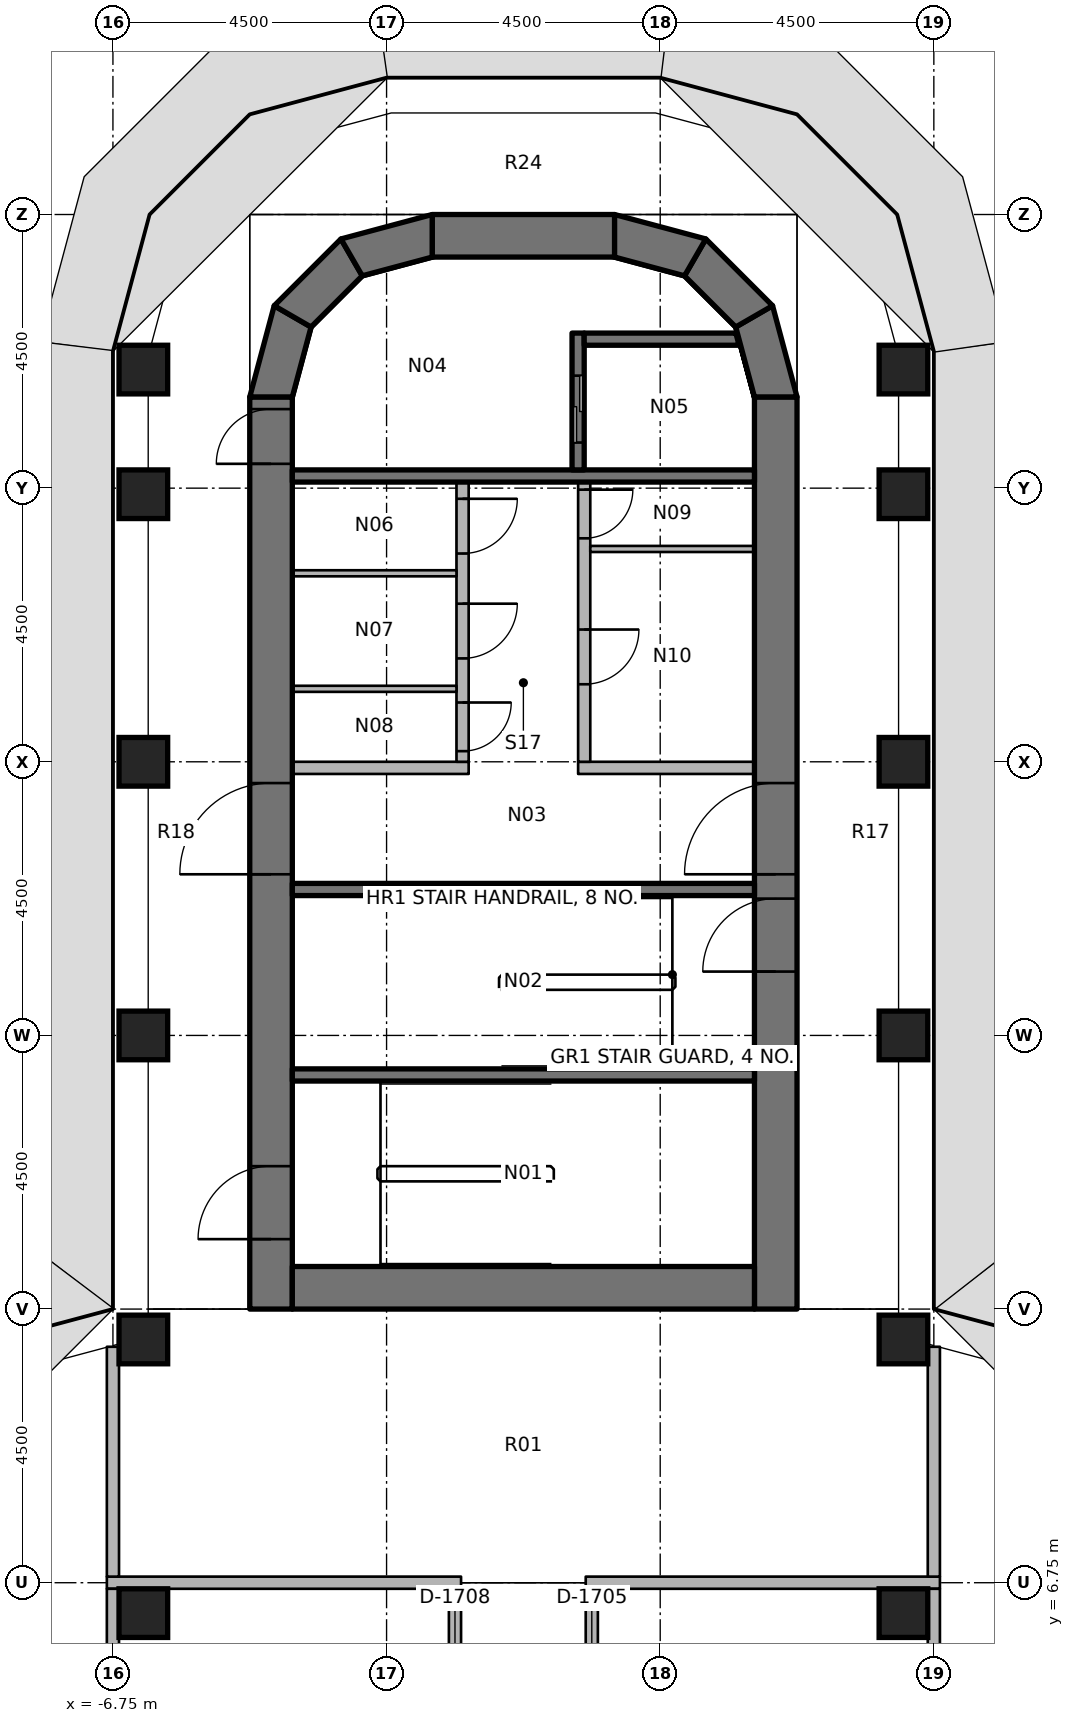
"""IFC4 building model, lengths in metres.
Left out: names, types, materials, properties, quantities, classifications, styles, units other than length and angle.
Written with IfcOpenShell. Run it as: python <this file> out.ifc"""

import sys

from ifc_helpers import new_model, si_unit, direction, frame, frame_2d, origin, origin_2d, place, context, subcontext, project, spatial, polyline, rectangle, outline, extrude, element, fill, save


model = new_model("IFC4")
c1 = context("Model", 3, precision=1e-05, world=origin(), true_north=direction((0.0, 1.0)))
c2 = subcontext(c1, "Body", "Model", "MODEL_VIEW")
j1 = project(units=[si_unit("LENGTHUNIT", "METRE"), si_unit("PLANEANGLEUNIT", "RADIAN")], contexts=[c1])
p1 = place(None, origin())
s1 = spatial("IfcSite", under=j1, at=p1, CompositionType="ELEMENT")
p2 = place(p1, origin())
s2 = spatial("IfcBuilding", under=s1, at=p2, CompositionType="ELEMENT")
p3 = place(p2, frame((0.0, 0.0, 160.0)))
s3 = spatial("IfcBuildingStorey", under=s2, at=p3, CompositionType="ELEMENT", Elevation=160.0)
for number, where, z_axis, x_axis in (
    (1, (-6.25, 6.25, 0.0), (0.0, 0.0, 1.0), (1.0, 0.0, 0.0)),
    (2, (-6.25, 10.75, 0.0), (0.0, 0.0, 1.0), (1.0, 0.0, 0.0)),
    (3, (-6.25, 15.75, 0.0), (0.0, 0.0, 1.0), (1.0, 0.0, 0.0)),
    (4, (-6.25, 20.25, 0.0), (0.0, 0.0, 1.0), (1.0, 0.0, 0.0)),
    (5, (-6.25, 24.65, 0.0), (0.0, 0.0, 1.0), (1.0, 0.0, 0.0)),
    (6, (-6.25, 26.7, 0.0), (0.0, 0.0, 1.0), (1.0, 0.0, 0.0)),
    (7, (6.25, 6.25, 0.0), (0.0, 0.0, 1.0), (1.0, 0.0, 0.0)),
    (8, (6.25, 10.75, 0.0), (0.0, 0.0, 1.0), (1.0, 0.0, 0.0)),
    (9, (6.25, 15.75, 0.0), (0.0, 0.0, 1.0), (1.0, 0.0, 0.0)),
    (10, (6.25, 20.25, 0.0), (0.0, 0.0, 1.0), (1.0, 0.0, 0.0)),
    (11, (6.25, 24.65, 0.0), (0.0, 0.0, 1.0), (1.0, 0.0, 0.0)),
    (12, (6.25, 26.7, 0.0), (0.0, 0.0, 1.0), (1.0, 0.0, 0.0)),
):
    element("IfcColumn", number, at=place(p3, frame(where, z_axis=z_axis, x_axis=x_axis)), inside=s3, PredefinedType="COLUMN", context=c2, shape_type="SweptSolid", body=[
        extrude(rectangle(XDim=0.8, YDim=0.8, at=origin_2d()), origin(), (0.0, 0.0, 1.0), 3.65),
    ])
p4 = place(p3, frame((-4.15, 11.25, 0.0), z_axis=(0.0, 0.0, 1.0), x_axis=(0.0, 1.0, 0.0)))
e13 = element("IfcWall", 13, at=p4, inside=s3, PredefinedType="SHEAR", context=c2, shape_type="SweptSolid", body=[
    extrude(rectangle(XDim=15.0, YDim=0.7, at=frame_2d((7.5, 0.0))), origin(), (0.0, 0.0, 1.0), 3.8),
])
p5 = place(p4, frame((7.15, 0.0, 0.0)))
e14 = element("IfcOpeningElement", 14, at=p5, cuts=e13, PredefinedType="OPENING", context=c2, shape_type="SweptSolid", body=[
    extrude(rectangle(XDim=1.5, YDim=2.3, at=frame_2d((0.75, 1.15))), frame((0.0, 0.36, 0.0), z_axis=(0.0, -1.0, 0.0), x_axis=(1.0, 0.0, 0.0)), (0.0, 0.0, 1.0), 0.72),
])
p6 = place(p4, frame((13.9, 0.0, 0.0)))
e15 = element("IfcOpeningElement", 15, at=p6, cuts=e13, PredefinedType="OPENING", context=c2, shape_type="SweptSolid", body=[
    extrude(rectangle(XDim=0.9, YDim=2.1, at=frame_2d((0.45, 1.05))), frame((0.0, 0.36, 0.0), z_axis=(0.0, -1.0, 0.0), x_axis=(1.0, 0.0, 0.0)), (0.0, 0.0, 1.0), 0.72),
])
p7 = place(p4, frame((1.15, 0.0, 0.0)))
e16 = element("IfcOpeningElement", 16, at=p7, cuts=e13, PredefinedType="OPENING", context=c2, shape_type="SweptSolid", body=[
    extrude(rectangle(XDim=1.2, YDim=2.1, at=frame_2d((0.6, 1.05))), frame((0.0, 0.36, 0.0), z_axis=(0.0, -1.0, 0.0), x_axis=(1.0, 0.0, 0.0)), (0.0, 0.0, 1.0), 0.72),
])
p8 = place(p3, frame((4.15, 11.25, 0.0), z_axis=(0.0, 0.0, 1.0), x_axis=(0.0, 1.0, 0.0)))
e17 = element("IfcWall", 17, at=p8, inside=s3, PredefinedType="SHEAR", context=c2, shape_type="SweptSolid", body=[
    extrude(rectangle(XDim=15.0, YDim=0.7, at=frame_2d((7.5, 0.0))), origin(), (0.0, 0.0, 1.0), 3.8),
])
p9 = place(p8, frame((7.15, 0.0, 0.0)))
e18 = element("IfcOpeningElement", 18, at=p9, cuts=e17, PredefinedType="OPENING", context=c2, shape_type="SweptSolid", body=[
    extrude(rectangle(XDim=1.5, YDim=2.3, at=frame_2d((0.75, 1.15))), frame((0.0, 0.36, 0.0), z_axis=(0.0, -1.0, 0.0), x_axis=(1.0, 0.0, 0.0)), (0.0, 0.0, 1.0), 0.72),
])
p10 = place(p8, frame((5.55, 0.0, 0.0)))
e19 = element("IfcOpeningElement", 19, at=p10, cuts=e17, PredefinedType="OPENING", context=c2, shape_type="SweptSolid", body=[
    extrude(rectangle(XDim=1.2, YDim=2.1, at=frame_2d((0.6, 1.05))), frame((0.0, 0.36, 0.0), z_axis=(0.0, -1.0, 0.0), x_axis=(1.0, 0.0, 0.0)), (0.0, 0.0, 1.0), 0.72),
])
p11 = place(p3, frame((-3.8, 11.6, 0.0), z_axis=(0.0, 0.0, 1.0), x_axis=(1.0, 0.0, 0.0)))
e20 = element("IfcWall", 20, at=p11, inside=s3, PredefinedType="SHEAR", context=c2, shape_type="SweptSolid", body=[
    extrude(rectangle(XDim=7.6, YDim=0.7, at=frame_2d((3.8, 0.0))), origin(), (0.0, 0.0, 1.0), 3.8),
])
p12 = place(p3, frame((-1.5, 28.9, 0.0), z_axis=(0.0, 0.0, 1.0), x_axis=(1.0, 0.0, 0.0)))
e21 = element("IfcWall", 21, at=p12, inside=s3, PredefinedType="SHEAR", context=c2, shape_type="SweptSolid", body=[
    extrude(rectangle(XDim=3.0, YDim=0.7, at=frame_2d((1.5, 0.0))), origin(), (0.0, 0.0, 1.0), 3.8),
])
p13 = place(p3, origin())
e22 = element("IfcWall", 22, at=p13, inside=s3, PredefinedType="SHEAR", context=c2, shape_type="SweptSolid", body=[
    extrude(outline(polyline([(-4.5, 26.25), (-4.098, 27.75), (-3.492, 27.4), (-3.8, 26.25), (-4.5, 26.25)])), origin(), (0.0, 0.0, 1.0), 3.8),
])
p14 = place(p3, origin())
e23 = element("IfcWall", 23, at=p14, inside=s3, PredefinedType="SHEAR", context=c2, shape_type="SweptSolid", body=[
    extrude(outline(polyline([(-4.098, 27.75), (-3.0, 28.848), (-2.65, 28.242), (-3.492, 27.4), (-4.098, 27.75)])), origin(), (0.0, 0.0, 1.0), 3.8),
])
p15 = place(p3, origin())
e24 = element("IfcWall", 24, at=p15, inside=s3, PredefinedType="SHEAR", context=c2, shape_type="SweptSolid", body=[
    extrude(outline(polyline([(-3.0, 28.848), (-1.5, 29.25), (-1.5, 28.55), (-2.65, 28.242), (-3.0, 28.848)])), origin(), (0.0, 0.0, 1.0), 3.8),
])
p16 = place(p3, origin())
e25 = element("IfcWall", 25, at=p16, inside=s3, PredefinedType="SHEAR", context=c2, shape_type="SweptSolid", body=[
    extrude(outline(polyline([(4.5, 26.25), (4.098, 27.75), (3.492, 27.4), (3.8, 26.25), (4.5, 26.25)])), origin(), (0.0, 0.0, 1.0), 3.8),
])
p17 = place(p3, origin())
e26 = element("IfcWall", 26, at=p17, inside=s3, PredefinedType="SHEAR", context=c2, shape_type="SweptSolid", body=[
    extrude(outline(polyline([(4.098, 27.75), (3.0, 28.848), (2.65, 28.242), (3.492, 27.4), (4.098, 27.75)])), origin(), (0.0, 0.0, 1.0), 3.8),
])
p18 = place(p3, origin())
e27 = element("IfcWall", 27, at=p18, inside=s3, PredefinedType="SHEAR", context=c2, shape_type="SweptSolid", body=[
    extrude(outline(polyline([(3.0, 28.848), (1.5, 29.25), (1.5, 28.55), (2.65, 28.242), (3.0, 28.848)])), origin(), (0.0, 0.0, 1.0), 3.8),
])
p19 = place(p3, frame((-3.8, 24.95, 0.0), z_axis=(0.0, 0.0, 1.0), x_axis=(1.0, 0.0, 0.0)))
e28 = element("IfcWall", 28, at=p19, inside=s3, PredefinedType="SHEAR", context=c2, shape_type="SweptSolid", body=[
    extrude(rectangle(XDim=7.6, YDim=0.2, at=frame_2d((3.8, 0.0))), origin(), (0.0, 0.0, 1.0), 3.65),
])
p20 = place(p3, frame((0.9, 27.3, 0.0), z_axis=(0.0, 0.0, 1.0), x_axis=(0.0, -1.0, 0.0)))
e29 = element("IfcWall", 29, at=p20, inside=s3, PredefinedType="SHEAR", context=c2, shape_type="SweptSolid", body=[
    extrude(rectangle(XDim=2.25, YDim=0.2, at=frame_2d((1.125, 0.0))), origin(), (0.0, 0.0, 1.0), 3.65),
])
p21 = place(p20, frame((0.7, 0.0, 0.0)))
e30 = element("IfcOpeningElement", 30, at=p21, cuts=e29, PredefinedType="OPENING", context=c2, shape_type="SweptSolid", body=[
    extrude(rectangle(XDim=1.1, YDim=2.3, at=frame_2d((0.55, 1.15))), frame((0.0, 0.11, 0.0), z_axis=(0.0, -1.0, 0.0), x_axis=(1.0, 0.0, 0.0)), (0.0, 0.0, 1.0), 0.22),
])
p22 = place(p3, origin())
e31 = element("IfcWall", 31, at=p22, inside=s3, PredefinedType="SHEAR", context=c2, shape_type="SweptSolid", body=[
    extrude(outline(polyline([(1.0, 27.1), (3.548, 27.1), (3.494, 27.3), (1.0, 27.3), (1.0, 27.1)])), origin(), (0.0, 0.0, 1.0), 3.65),
])
for number, where, z_axis, x_axis in (
    (32, (-3.8, 18.15, 0.0), (0.0, 0.0, 1.0), (1.0, 0.0, 0.0)),
    (33, (-3.8, 15.1, 0.0), (0.0, 0.0, 1.0), (1.0, 0.0, 0.0)),
):
    element("IfcWall", number, at=place(p3, frame(where, z_axis=z_axis, x_axis=x_axis)), inside=s3, PredefinedType="SHEAR", context=c2, shape_type="SweptSolid", body=[
        extrude(rectangle(XDim=7.6, YDim=0.2, at=frame_2d((3.8, 0.0))), origin(), (0.0, 0.0, 1.0), 3.65),
    ])
p23 = place(p3, frame((-3.8, 20.15, 0.0), z_axis=(0.0, 0.0, 1.0), x_axis=(1.0, 0.0, 0.0)))
e34 = element("IfcWall", 34, at=p23, inside=s3, PredefinedType="PARTITIONING", context=c2, shape_type="SweptSolid", body=[
    extrude(rectangle(XDim=2.9, YDim=0.2, at=frame_2d((1.45, 0.0))), origin(), (0.0, 0.0, 1.0), 3.65),
])
p24 = place(p3, frame((-1.0, 24.85, 0.0), z_axis=(0.0, 0.0, 1.0), x_axis=(0.0, -1.0, 0.0)))
e35 = element("IfcWall", 35, at=p24, inside=s3, PredefinedType="PARTITIONING", context=c2, shape_type="SweptSolid", body=[
    extrude(rectangle(XDim=4.6, YDim=0.2, at=frame_2d((2.3, 0.0))), origin(), (0.0, 0.0, 1.0), 3.65),
])
p25 = place(p24, frame((0.275, 0.0, 0.0)))
e36 = element("IfcOpeningElement", 36, at=p25, cuts=e35, PredefinedType="OPENING", context=c2, shape_type="SweptSolid", body=[
    extrude(rectangle(XDim=0.9, YDim=2.1, at=frame_2d((0.45, 1.05))), frame((0.0, 0.11, 0.0), z_axis=(0.0, -1.0, 0.0), x_axis=(1.0, 0.0, 0.0)), (0.0, 0.0, 1.0), 0.22),
])
p26 = place(p24, frame((2.0, 0.0, 0.0)))
e37 = element("IfcOpeningElement", 37, at=p26, cuts=e35, PredefinedType="OPENING", context=c2, shape_type="SweptSolid", body=[
    extrude(rectangle(XDim=0.9, YDim=2.1, at=frame_2d((0.45, 1.05))), frame((0.0, 0.11, 0.0), z_axis=(0.0, -1.0, 0.0), x_axis=(1.0, 0.0, 0.0)), (0.0, 0.0, 1.0), 0.22),
])
p27 = place(p24, frame((3.625, 0.0, 0.0)))
e38 = element("IfcOpeningElement", 38, at=p27, cuts=e35, PredefinedType="OPENING", context=c2, shape_type="SweptSolid", body=[
    extrude(rectangle(XDim=0.8, YDim=2.1, at=frame_2d((0.4, 1.05))), frame((0.0, 0.11, 0.0), z_axis=(0.0, -1.0, 0.0), x_axis=(1.0, 0.0, 0.0)), (0.0, 0.0, 1.0), 0.22),
])
p28 = place(p3, frame((0.9, 20.15, 0.0), z_axis=(0.0, 0.0, 1.0), x_axis=(1.0, 0.0, 0.0)))
e39 = element("IfcWall", 39, at=p28, inside=s3, PredefinedType="PARTITIONING", context=c2, shape_type="SweptSolid", body=[
    extrude(rectangle(XDim=2.9, YDim=0.2, at=frame_2d((1.45, 0.0))), origin(), (0.0, 0.0, 1.0), 3.65),
])
p29 = place(p3, frame((1.0, 24.85, 0.0), z_axis=(0.0, 0.0, 1.0), x_axis=(0.0, -1.0, 0.0)))
e40 = element("IfcWall", 40, at=p29, inside=s3, PredefinedType="PARTITIONING", context=c2, shape_type="SweptSolid", body=[
    extrude(rectangle(XDim=4.6, YDim=0.2, at=frame_2d((2.3, 0.0))), origin(), (0.0, 0.0, 1.0), 3.65),
])
p30 = place(p29, frame((0.125, 0.0, 0.0)))
e41 = element("IfcOpeningElement", 41, at=p30, cuts=e40, PredefinedType="OPENING", context=c2, shape_type="SweptSolid", body=[
    extrude(rectangle(XDim=0.8, YDim=2.1, at=frame_2d((0.4, 1.05))), frame((0.0, 0.11, 0.0), z_axis=(0.0, -1.0, 0.0), x_axis=(1.0, 0.0, 0.0)), (0.0, 0.0, 1.0), 0.22),
])
p31 = place(p29, frame((2.425, 0.0, 0.0)))
e42 = element("IfcOpeningElement", 42, at=p31, cuts=e40, PredefinedType="OPENING", context=c2, shape_type="SweptSolid", body=[
    extrude(rectangle(XDim=0.9, YDim=2.1, at=frame_2d((0.45, 1.05))), frame((0.0, 0.11, 0.0), z_axis=(0.0, -1.0, 0.0), x_axis=(1.0, 0.0, 0.0)), (0.0, 0.0, 1.0), 0.22),
])
for number, where, z_axis, x_axis in (
    (43, (-3.8, 23.35, 0.0), (0.0, 0.0, 1.0), (1.0, 0.0, 0.0)),
    (44, (-3.8, 21.45, 0.0), (0.0, 0.0, 1.0), (1.0, 0.0, 0.0)),
    (45, (1.1, 23.75, 0.0), (0.0, 0.0, 1.0), (1.0, 0.0, 0.0)),
):
    element("IfcWall", number, at=place(p3, frame(where, z_axis=z_axis, x_axis=x_axis)), inside=s3, PredefinedType="PARTITIONING", context=c2, shape_type="SweptSolid", body=[
        extrude(rectangle(XDim=2.7, YDim=0.1, at=frame_2d((1.35, 0.0))), origin(), (0.0, 0.0, 1.0), 3.65),
    ])
p32 = place(p3, frame((1.125, 6.65, 0.0), z_axis=(0.0, 0.0, 1.0), x_axis=(0.0, -1.0, 0.0)))
e46 = element("IfcWall", 46, at=p32, inside=s3, PredefinedType="PARTITIONING", context=c2, shape_type="SweptSolid", body=[
    extrude(rectangle(XDim=3.05, YDim=0.2, at=frame_2d((1.525, 0.0))), origin(), (0.0, 0.0, 1.0), 2.75),
])
p33 = place(p32, frame((1.075, 0.0, 0.0)))
e47 = element("IfcOpeningElement", 47, at=p33, cuts=e46, PredefinedType="OPENING", context=c2, shape_type="SweptSolid", body=[
    extrude(rectangle(XDim=0.9, YDim=2.1, at=frame_2d((0.45, 1.05))), frame((0.0, 0.11, 0.0), z_axis=(0.0, -1.0, 0.0), x_axis=(1.0, 0.0, 0.0)), (0.0, 0.0, 1.0), 0.22),
])
p34 = place(p3, frame((-1.125, 3.6, 0.0), z_axis=(0.0, 0.0, 1.0), x_axis=(0.0, 1.0, 0.0)))
e48 = element("IfcWall", 48, at=p34, inside=s3, PredefinedType="PARTITIONING", context=c2, shape_type="SweptSolid", body=[
    extrude(rectangle(XDim=3.05, YDim=0.2, at=frame_2d((1.525, 0.0))), origin(), (0.0, 0.0, 1.0), 2.75),
])
p35 = place(p34, frame((1.075, 0.0, 0.0)))
e49 = element("IfcOpeningElement", 49, at=p35, cuts=e48, PredefinedType="OPENING", context=c2, shape_type="SweptSolid", body=[
    extrude(rectangle(XDim=0.9, YDim=2.1, at=frame_2d((0.45, 1.05))), frame((0.0, 0.11, 0.0), z_axis=(0.0, -1.0, 0.0), x_axis=(1.0, 0.0, 0.0)), (0.0, 0.0, 1.0), 0.22),
])
p36 = place(p3, frame((1.025, 6.75, 0.0), z_axis=(0.0, 0.0, 1.0), x_axis=(1.0, 0.0, 0.0)))
e50 = element("IfcWall", 50, at=p36, inside=s3, PredefinedType="PARTITIONING", context=c2, shape_type="SweptSolid", body=[
    extrude(rectangle(XDim=5.825, YDim=0.2, at=frame_2d((2.913, 0.0))), origin(), (0.0, 0.0, 1.0), 2.75),
])
p37 = place(p3, frame((6.75, 6.85, 0.0), z_axis=(0.0, 0.0, 1.0), x_axis=(0.0, 1.0, 0.0)))
e51 = element("IfcWall", 51, at=p37, inside=s3, PredefinedType="PARTITIONING", context=c2, shape_type="SweptSolid", body=[
    extrude(rectangle(XDim=3.78, YDim=0.2, at=frame_2d((1.89, 0.0))), origin(), (0.0, 0.0, 1.0), 2.75),
])
p38 = place(p3, frame((-6.85, 6.75, 0.0), z_axis=(0.0, 0.0, 1.0), x_axis=(1.0, 0.0, 0.0)))
e52 = element("IfcWall", 52, at=p38, inside=s3, PredefinedType="PARTITIONING", context=c2, shape_type="SweptSolid", body=[
    extrude(rectangle(XDim=5.825, YDim=0.2, at=frame_2d((2.913, 0.0))), origin(), (0.0, 0.0, 1.0), 2.75),
])
p39 = place(p3, frame((-6.75, 6.85, 0.0), z_axis=(0.0, 0.0, 1.0), x_axis=(0.0, 1.0, 0.0)))
e53 = element("IfcWall", 53, at=p39, inside=s3, PredefinedType="PARTITIONING", context=c2, shape_type="SweptSolid", body=[
    extrude(rectangle(XDim=3.78, YDim=0.2, at=frame_2d((1.89, 0.0))), origin(), (0.0, 0.0, 1.0), 2.75),
])
for number, where, z_axis, x_axis in (
    (54, (6.75, 3.6, 0.0), (0.0, 0.0, 1.0), (0.0, 1.0, 0.0)),
    (55, (-6.75, 3.6, 0.0), (0.0, 0.0, 1.0), (0.0, 1.0, 0.0)),
):
    element("IfcWall", number, at=place(p3, frame(where, z_axis=z_axis, x_axis=x_axis)), inside=s3, PredefinedType="PARTITIONING", context=c2, shape_type="SweptSolid", body=[
        extrude(rectangle(XDim=3.05, YDim=0.2, at=frame_2d((1.525, 0.0))), origin(), (0.0, 0.0, 1.0), 2.75),
    ])
p40 = place(p5, origin())
e56 = element("IfcDoor", 56, at=p40, inside=s3, OperationType="DOUBLE_DOOR_SINGLE_SWING", PredefinedType="DOOR", context=c2, shape_type="SweptSolid", body=[
    extrude(rectangle(XDim=1.5, YDim=2.3, at=frame_2d((0.75, 1.15))), frame((0.0, 0.025, 0.0), z_axis=(0.0, -1.0, 0.0), x_axis=(1.0, 0.0, 0.0)), (0.0, 0.0, 1.0), 0.05),
])
fill(e14, e56)
p41 = place(p9, origin())
e57 = element("IfcDoor", 57, at=p41, inside=s3, OperationType="DOUBLE_DOOR_SINGLE_SWING", PredefinedType="DOOR", context=c2, shape_type="SweptSolid", body=[
    extrude(rectangle(XDim=1.5, YDim=2.3, at=frame_2d((0.75, 1.15))), frame((0.0, 0.025, 0.0), z_axis=(0.0, -1.0, 0.0), x_axis=(1.0, 0.0, 0.0)), (0.0, 0.0, 1.0), 0.05),
])
fill(e18, e57)
p42 = place(p6, origin())
e58 = element("IfcDoor", 58, at=p42, inside=s3, OperationType="SINGLE_SWING_LEFT", PredefinedType="DOOR", context=c2, shape_type="SweptSolid", body=[
    extrude(rectangle(XDim=0.9, YDim=2.1, at=frame_2d((0.45, 1.05))), frame((0.0, 0.025, 0.0), z_axis=(0.0, -1.0, 0.0), x_axis=(1.0, 0.0, 0.0)), (0.0, 0.0, 1.0), 0.05),
])
fill(e15, e58)
p43 = place(p10, origin())
e59 = element("IfcDoor", 59, at=p43, inside=s3, OperationType="SINGLE_SWING_RIGHT", PredefinedType="DOOR", context=c2, shape_type="SweptSolid", body=[
    extrude(rectangle(XDim=1.2, YDim=2.1, at=frame_2d((0.6, 1.05))), frame((0.0, 0.025, 0.0), z_axis=(0.0, -1.0, 0.0), x_axis=(1.0, 0.0, 0.0)), (0.0, 0.0, 1.0), 0.05),
])
fill(e19, e59)
p44 = place(p7, origin())
e60 = element("IfcDoor", 60, at=p44, inside=s3, OperationType="SINGLE_SWING_LEFT", PredefinedType="DOOR", context=c2, shape_type="SweptSolid", body=[
    extrude(rectangle(XDim=1.2, YDim=2.1, at=frame_2d((0.6, 1.05))), frame((0.0, 0.025, 0.0), z_axis=(0.0, -1.0, 0.0), x_axis=(1.0, 0.0, 0.0)), (0.0, 0.0, 1.0), 0.05),
])
fill(e16, e60)
p45 = place(p21, origin())
e61 = element("IfcDoor", 61, at=p45, inside=s3, OperationType="DOUBLE_DOOR_SLIDING", PredefinedType="DOOR", context=c2, shape_type="SweptSolid", body=[
    extrude(rectangle(XDim=1.1, YDim=2.3, at=frame_2d((0.55, 1.15))), frame((0.0, 0.025, 0.0), z_axis=(0.0, -1.0, 0.0), x_axis=(1.0, 0.0, 0.0)), (0.0, 0.0, 1.0), 0.05),
])
fill(e30, e61)
p46 = place(p25, origin())
e62 = element("IfcDoor", 62, at=p46, inside=s3, OperationType="SINGLE_SWING_RIGHT", PredefinedType="DOOR", context=c2, shape_type="SweptSolid", body=[
    extrude(rectangle(XDim=0.9, YDim=2.1, at=frame_2d((0.45, 1.05))), frame((0.0, 0.025, 0.0), z_axis=(0.0, -1.0, 0.0), x_axis=(1.0, 0.0, 0.0)), (0.0, 0.0, 1.0), 0.05),
])
fill(e36, e62)
p47 = place(p26, origin())
e63 = element("IfcDoor", 63, at=p47, inside=s3, OperationType="SINGLE_SWING_LEFT", PredefinedType="DOOR", context=c2, shape_type="SweptSolid", body=[
    extrude(rectangle(XDim=0.9, YDim=2.1, at=frame_2d((0.45, 1.05))), frame((0.0, 0.025, 0.0), z_axis=(0.0, -1.0, 0.0), x_axis=(1.0, 0.0, 0.0)), (0.0, 0.0, 1.0), 0.05),
])
fill(e37, e63)
p48 = place(p27, origin())
e64 = element("IfcDoor", 64, at=p48, inside=s3, OperationType="SINGLE_SWING_RIGHT", PredefinedType="DOOR", context=c2, shape_type="SweptSolid", body=[
    extrude(rectangle(XDim=0.8, YDim=2.1, at=frame_2d((0.4, 1.05))), frame((0.0, 0.025, 0.0), z_axis=(0.0, -1.0, 0.0), x_axis=(1.0, 0.0, 0.0)), (0.0, 0.0, 1.0), 0.05),
])
fill(e38, e64)
p49 = place(p30, origin())
e65 = element("IfcDoor", 65, at=p49, inside=s3, OperationType="SINGLE_SWING_LEFT", PredefinedType="DOOR", context=c2, shape_type="SweptSolid", body=[
    extrude(rectangle(XDim=0.8, YDim=2.1, at=frame_2d((0.4, 1.05))), frame((0.0, 0.025, 0.0), z_axis=(0.0, -1.0, 0.0), x_axis=(1.0, 0.0, 0.0)), (0.0, 0.0, 1.0), 0.05),
])
fill(e41, e65)
p50 = place(p31, origin())
e66 = element("IfcDoor", 66, at=p50, inside=s3, OperationType="SINGLE_SWING_RIGHT", PredefinedType="DOOR", context=c2, shape_type="SweptSolid", body=[
    extrude(rectangle(XDim=0.9, YDim=2.1, at=frame_2d((0.45, 1.05))), frame((0.0, 0.025, 0.0), z_axis=(0.0, -1.0, 0.0), x_axis=(1.0, 0.0, 0.0)), (0.0, 0.0, 1.0), 0.05),
])
fill(e42, e66)
save(model, sys.argv[1])
